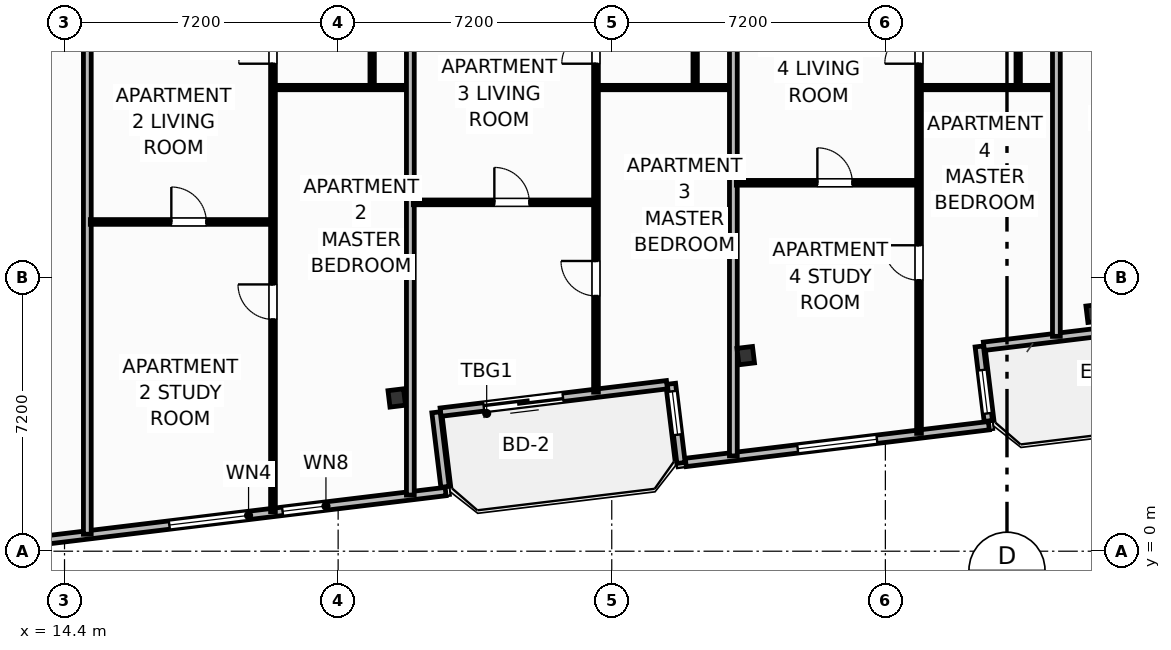
"""IFC4 building model, lengths in metres.
Left out: names, types, materials, properties, quantities, classifications, styles, units other than length and angle.
Written with IfcOpenShell. Run it as: python <this file> out.ifc"""

import sys

from ifc_helpers import new_model, si_unit, direction, frame, frame_2d, origin, origin_2d, place, context, subcontext, project, spatial, rectangle, i_section, extrude, element, fill, save


model = new_model("IFC4")
c1 = context("Model", 3, precision=1e-05, world=origin(), true_north=direction((0.0, 1.0)))
c2 = subcontext(c1, "Body", "Model", "MODEL_VIEW")
j1 = project(units=[si_unit("LENGTHUNIT", "METRE"), si_unit("PLANEANGLEUNIT", "RADIAN")], contexts=[c1])
p1 = place(None, origin())
s1 = spatial("IfcSite", under=j1, at=p1, CompositionType="ELEMENT")
p2 = place(p1, origin())
s2 = spatial("IfcBuilding", under=s1, at=p2, CompositionType="ELEMENT")
p3 = place(p2, frame((0.0, 0.0, 196.8)))
s3 = spatial("IfcBuildingStorey", under=s2, at=p3, CompositionType="ELEMENT", Elevation=196.8)
for number, where, z_axis, x_axis in (
    (1, (23.143, 4.033, 0.0), (0.0, 0.0, 1.0), (0.993, 0.12, 0.0)),
    (2, (32.325, 5.146, 0.0), (0.0, 0.0, 1.0), (0.993, 0.12, 0.0)),
    (3, (41.508, 6.26, 0.0), (0.0, 0.0, 1.0), (0.993, 0.12, 0.0)),
):
    element("IfcColumn", number, at=place(p3, frame(where, z_axis=z_axis, x_axis=x_axis)), inside=s3, PredefinedType="COLUMN", context=c2, shape_type="SweptSolid", body=[
        extrude(i_section(OverallWidth=0.412, OverallDepth=0.435, WebThickness=0.036, FlangeThickness=0.057, FilletRadius=0.025, at=origin_2d()), origin(), (0.0, 0.0, 1.0), 3.7),
    ])
p4 = place(p3, frame((30.252, 4.381, 0.0), z_axis=(0.0, 0.0, 1.0), x_axis=(-0.992735402148, -0.120318000826, 0.0)))
e4 = element("IfcWall", 4, at=p4, inside=s3, PredefinedType="SOLIDWALL", context=c2, shape_type="SweptSolid", body=[
    extrude(rectangle(XDim=6.0, YDim=0.22, at=frame_2d((3.0, 0.0))), origin(), (0.0, 0.0, 1.0), 2.73),
])
p5 = place(p4, frame((2.756, 0.0, 0.0)))
e5 = element("IfcOpeningElement", 5, at=p5, cuts=e4, PredefinedType="OPENING", context=c2, shape_type="SweptSolid", body=[
    extrude(rectangle(XDim=2.1, YDim=2.3, at=frame_2d((1.05, 1.15))), frame((0.0, 0.12, 0.0), z_axis=(0.0, -1.0, 0.0), x_axis=(1.0, 0.0, 0.0)), (0.0, 0.0, 1.0), 0.24),
])
p6 = place(p3, frame((44.548, 6.114, 0.0), z_axis=(0.0, 0.0, 1.0), x_axis=(-0.992735402148, -0.120318000826, 0.0)))
e6 = element("IfcWall", 6, at=p6, inside=s3, PredefinedType="SOLIDWALL", context=c2, shape_type="SweptSolid", body=[
    extrude(rectangle(XDim=6.0, YDim=0.22, at=frame_2d((3.0, 0.0))), origin(), (0.0, 0.0, 1.0), 2.73),
])
p7 = place(p6, frame((0.4, 0.0, 0.0)))
e7 = element("IfcOpeningElement", 7, at=p7, cuts=e6, PredefinedType="OPENING", context=c2, shape_type="SweptSolid", body=[
    extrude(rectangle(XDim=2.1, YDim=2.3, at=frame_2d((1.05, 1.15))), frame((0.0, 0.12, 0.0), z_axis=(0.0, -1.0, 0.0), x_axis=(1.0, 0.0, 0.0)), (0.0, 0.0, 1.0), 0.24),
])
p8 = place(p3, frame((11.972, 0.06, 0.0), z_axis=(0.0, 0.0, 1.0), x_axis=(0.992732021049, 0.120345894751, 0.0)))
e8 = element("IfcWall", 8, at=p8, inside=s3, PredefinedType="SOLIDWALL", context=c2, shape_type="SweptSolid", body=[
    extrude(rectangle(XDim=12.547, YDim=0.22, at=frame_2d((6.274, 0.0))), origin(), (0.0, 0.0, 1.0), 2.73),
])
p9 = place(p8, frame((5.224, 0.0, 0.8)))
e9 = element("IfcOpeningElement", 9, at=p9, cuts=e8, PredefinedType="OPENING", context=c2, shape_type="SweptSolid", body=[
    extrude(rectangle(XDim=2.1, YDim=1.75, at=frame_2d((1.05, 0.875))), frame((0.0, 0.12, 0.0), z_axis=(0.0, -1.0, 0.0), x_axis=(1.0, 0.0, 0.0)), (0.0, 0.0, 1.0), 0.24),
])
p10 = place(p8, frame((8.225, 0.0, 0.8)))
e10 = element("IfcOpeningElement", 10, at=p10, cuts=e8, PredefinedType="OPENING", context=c2, shape_type="SweptSolid", body=[
    extrude(rectangle(XDim=1.15, YDim=1.4, at=frame_2d((0.575, 0.7))), frame((0.0, 0.12, 0.0), z_axis=(0.0, -1.0, 0.0), x_axis=(1.0, 0.0, 0.0)), (0.0, 0.0, 1.0), 0.24),
])
p11 = place(p3, frame((24.413, 1.694, 0.0), z_axis=(0.0, 0.0, 1.0), x_axis=(-0.120290754542, 0.992738703976, 0.0)))
e11 = element("IfcWall", 11, at=p11, inside=s3, PredefinedType="SOLIDWALL", context=c2, shape_type="SweptSolid", body=[
    extrude(rectangle(XDim=1.975, YDim=0.22, at=frame_2d((0.987, 0.0))), origin(), (0.0, 0.0, 1.0), 2.73),
])
p12 = place(p3, frame((30.37, 4.406, 0.0), z_axis=(0.0, 0.0, 1.0), x_axis=(0.120327895535, -0.992734202874, 0.0)))
e12 = element("IfcWall", 12, at=p12, inside=s3, PredefinedType="SOLIDWALL", context=c2, shape_type="SweptSolid", body=[
    extrude(rectangle(XDim=2.1, YDim=0.22, at=frame_2d((1.05, 0.0))), origin(), (0.0, 0.0, 1.0), 2.73),
])
p13 = place(p12, frame((0.2, 0.0, 0.8)))
e13 = element("IfcOpeningElement", 13, at=p13, cuts=e12, PredefinedType="OPENING", context=c2, shape_type="SweptSolid", body=[
    extrude(rectangle(XDim=1.15, YDim=1.4, at=frame_2d((0.575, 0.7))), frame((0.0, 0.12, 0.0), z_axis=(0.0, -1.0, 0.0), x_axis=(1.0, 0.0, 0.0)), (0.0, 0.0, 1.0), 0.24),
])
p14 = place(p3, frame((30.747, 2.336, 0.0), z_axis=(0.0, 0.0, 1.0), x_axis=(0.992731032022, 0.120354052946, 0.0)))
e14 = element("IfcWall", 14, at=p14, inside=s3, PredefinedType="SOLIDWALL", context=c2, shape_type="SweptSolid", body=[
    extrude(rectangle(XDim=8.035, YDim=0.22, at=frame_2d((4.018, 0.0))), origin(), (0.0, 0.0, 1.0), 2.73),
])
p15 = place(p14, frame((2.968, 0.0, 0.8)))
e15 = element("IfcOpeningElement", 15, at=p15, cuts=e14, PredefinedType="OPENING", context=c2, shape_type="SweptSolid", body=[
    extrude(rectangle(XDim=2.1, YDim=1.75, at=frame_2d((1.05, 0.875))), frame((0.0, 0.12, 0.0), z_axis=(0.0, -1.0, 0.0), x_axis=(1.0, 0.0, 0.0)), (0.0, 0.0, 1.0), 0.24),
])
p16 = place(p3, frame((38.709, 3.427, 0.0), z_axis=(0.0, 0.0, 1.0), x_axis=(-0.120397815541, 0.992725725472, 0.0)))
e16 = element("IfcWall", 16, at=p16, inside=s3, PredefinedType="SOLIDWALL", context=c2, shape_type="SweptSolid", body=[
    extrude(rectangle(XDim=1.975, YDim=0.22, at=frame_2d((0.988, 0.0))), origin(), (0.0, 0.0, 1.0), 2.73),
])
p17 = place(p16, frame((0.2, 0.0, 0.8)))
e17 = element("IfcOpeningElement", 17, at=p17, cuts=e16, PredefinedType="OPENING", context=c2, shape_type="SweptSolid", body=[
    extrude(rectangle(XDim=1.15, YDim=1.4, at=frame_2d((0.575, 0.7))), frame((0.0, 0.12, 0.0), z_axis=(0.0, -1.0, 0.0), x_axis=(1.0, 0.0, 0.0)), (0.0, 0.0, 1.0), 0.24),
])
p18 = place(p3, frame((15.0, 0.447, 0.0), z_axis=(0.0, 0.0, 1.0), x_axis=(0.0, 1.0, 0.0)))
e18 = element("IfcWall", 18, at=p18, inside=s3, PredefinedType="PARTITIONING", context=c2, shape_type="SweptSolid", body=[
    extrude(rectangle(XDim=16.403, YDim=0.205, at=frame_2d((8.202, 0.0))), origin(), (0.0, 0.0, 1.0), 3.45),
])
p19 = place(p3, frame((15.08, 8.663, 0.0), z_axis=(0.0, 0.0, 1.0), x_axis=(1.0, 0.0, 0.0)))
e19 = element("IfcWall", 19, at=p19, inside=s3, PredefinedType="PARTITIONING", context=c2, shape_type="SweptSolid", body=[
    extrude(rectangle(XDim=4.735, YDim=0.125, at=frame_2d((2.368, 0.0))), origin(), (0.0, 0.0, 1.0), 3.45),
])
p20 = place(p19, frame((2.131, 0.0, 0.0)))
e20 = element("IfcOpeningElement", 20, at=p20, cuts=e19, PredefinedType="OPENING", context=c2, shape_type="SweptSolid", body=[
    extrude(rectangle(XDim=0.92, YDim=2.05, at=frame_2d((0.46, 1.025))), frame((0.0, 0.073, 0.0), z_axis=(0.0, -1.0, 0.0), x_axis=(1.0, 0.0, 0.0)), (0.0, 0.0, 1.0), 0.145),
])
p21 = place(p3, frame((19.885, 1.039, 0.0), z_axis=(0.0, 0.0, 1.0), x_axis=(0.0, 1.0, 0.0)))
e21 = element("IfcWall", 21, at=p21, inside=s3, PredefinedType="PARTITIONING", context=c2, shape_type="SweptSolid", body=[
    extrude(rectangle(XDim=15.811, YDim=0.125, at=frame_2d((7.905, 0.0))), origin(), (0.0, 0.0, 1.0), 3.45),
])
p22 = place(p21, frame((5.06, 0.0, 0.0)))
e22 = element("IfcOpeningElement", 22, at=p22, cuts=e21, PredefinedType="OPENING", context=c2, shape_type="SweptSolid", body=[
    extrude(rectangle(XDim=0.92, YDim=2.05, at=frame_2d((0.46, 1.025))), frame((0.0, 0.073, 0.0), z_axis=(0.0, -1.0, 0.0), x_axis=(1.0, 0.0, 0.0)), (0.0, 0.0, 1.0), 0.145),
])
p23 = place(p21, frame((11.788, 0.0, 0.0)))
e23 = element("IfcOpeningElement", 23, at=p23, cuts=e21, PredefinedType="OPENING", context=c2, shape_type="SweptSolid", body=[
    extrude(rectangle(XDim=0.9, YDim=2.05, at=frame_2d((0.45, 1.025))), frame((0.0, 0.073, 0.0), z_axis=(0.0, -1.0, 0.0), x_axis=(1.0, 0.0, 0.0)), (0.0, 0.0, 1.0), 0.145),
])
p24 = place(p21, frame((14.081, 0.0, 0.0)))
e24 = element("IfcOpeningElement", 24, at=p24, cuts=e21, PredefinedType="OPENING", context=c2, shape_type="SweptSolid", body=[
    extrude(rectangle(XDim=0.92, YDim=2.05, at=frame_2d((0.46, 1.025))), frame((0.0, 0.073, 0.0), z_axis=(0.0, -1.0, 0.0), x_axis=(1.0, 0.0, 0.0)), (0.0, 0.0, 1.0), 0.145),
])
p25 = place(p3, frame((19.955, 12.2, 0.0), z_axis=(0.0, 0.0, 1.0), x_axis=(1.0, 0.0, 0.0)))
e25 = element("IfcWall", 25, at=p25, inside=s3, PredefinedType="PARTITIONING", context=c2, shape_type="SweptSolid", body=[
    extrude(rectangle(XDim=3.465, YDim=0.115, at=frame_2d((1.732, 0.0))), origin(), (0.0, 0.0, 1.0), 3.45),
])
p26 = place(p3, frame((22.495, 12.2, 0.0), z_axis=(0.0, 0.0, 1.0), x_axis=(0.0, 1.0, 0.0)))
e26 = element("IfcWall", 26, at=p26, inside=s3, PredefinedType="PARTITIONING", context=c2, shape_type="SweptSolid", body=[
    extrude(rectangle(XDim=2.24, YDim=0.115, at=frame_2d((1.12, 0.0))), origin(), (0.0, 0.0, 1.0), 3.45),
])
p27 = place(p3, frame((23.5, 1.478, 0.0), z_axis=(0.0, 0.0, 1.0), x_axis=(0.0, 1.0, 0.0)))
e27 = element("IfcWall", 27, at=p27, inside=s3, PredefinedType="PARTITIONING", context=c2, shape_type="SweptSolid", body=[
    extrude(rectangle(XDim=15.373, YDim=0.205, at=frame_2d((7.686, 0.0))), origin(), (0.0, 0.0, 1.0), 2.662),
])
p28 = place(p3, frame((23.58, 9.179, 0.0), z_axis=(0.0, 0.0, 1.0), x_axis=(1.0, 0.0, 0.0)))
e28 = element("IfcWall", 28, at=p28, inside=s3, PredefinedType="PARTITIONING", context=c2, shape_type="SweptSolid", body=[
    extrude(rectangle(XDim=4.735, YDim=0.125, at=frame_2d((2.368, 0.0))), origin(), (0.0, 0.0, 1.0), 3.018),
])
p29 = place(p28, frame((2.131, 0.0, 0.0)))
e29 = element("IfcOpeningElement", 29, at=p29, cuts=e28, PredefinedType="OPENING", context=c2, shape_type="SweptSolid", body=[
    extrude(rectangle(XDim=0.92, YDim=2.05, at=frame_2d((0.46, 1.025))), frame((0.0, 0.073, 0.0), z_axis=(0.0, -1.0, 0.0), x_axis=(1.0, 0.0, 0.0)), (0.0, 0.0, 1.0), 0.145),
])
p30 = place(p3, frame((28.385, 4.185, 0.0), z_axis=(0.0, 0.0, 1.0), x_axis=(0.0, 1.0, 0.0)))
e30 = element("IfcWall", 30, at=p30, inside=s3, PredefinedType="PARTITIONING", context=c2, shape_type="SweptSolid", body=[
    extrude(rectangle(XDim=12.665, YDim=0.125, at=frame_2d((6.333, 0.0))), origin(), (0.0, 0.0, 1.0), 3.45),
])
p31 = place(p30, frame((2.531, 0.0, 0.0)))
e31 = element("IfcOpeningElement", 31, at=p31, cuts=e30, PredefinedType="OPENING", context=c2, shape_type="SweptSolid", body=[
    extrude(rectangle(XDim=0.92, YDim=2.05, at=frame_2d((0.46, 1.025))), frame((0.0, 0.073, 0.0), z_axis=(0.0, -1.0, 0.0), x_axis=(1.0, 0.0, 0.0)), (0.0, 0.0, 1.0), 0.145),
])
p32 = place(p30, frame((8.642, 0.0, 0.0)))
e32 = element("IfcOpeningElement", 32, at=p32, cuts=e30, PredefinedType="OPENING", context=c2, shape_type="SweptSolid", body=[
    extrude(rectangle(XDim=0.9, YDim=2.05, at=frame_2d((0.45, 1.025))), frame((0.0, 0.073, 0.0), z_axis=(0.0, -1.0, 0.0), x_axis=(1.0, 0.0, 0.0)), (0.0, 0.0, 1.0), 0.145),
])
p33 = place(p30, frame((10.935, 0.0, 0.0)))
e33 = element("IfcOpeningElement", 33, at=p33, cuts=e30, PredefinedType="OPENING", context=c2, shape_type="SweptSolid", body=[
    extrude(rectangle(XDim=0.92, YDim=2.05, at=frame_2d((0.46, 1.025))), frame((0.0, 0.073, 0.0), z_axis=(0.0, -1.0, 0.0), x_axis=(1.0, 0.0, 0.0)), (0.0, 0.0, 1.0), 0.145),
])
p34 = place(p3, frame((28.455, 12.2, 0.0), z_axis=(0.0, 0.0, 1.0), x_axis=(1.0, 0.0, 0.0)))
e34 = element("IfcWall", 34, at=p34, inside=s3, PredefinedType="PARTITIONING", context=c2, shape_type="SweptSolid", body=[
    extrude(rectangle(XDim=3.465, YDim=0.115, at=frame_2d((1.732, 0.0))), origin(), (0.0, 0.0, 1.0), 3.45),
])
p35 = place(p3, frame((30.995, 12.2, 0.0), z_axis=(0.0, 0.0, 1.0), x_axis=(0.0, 1.0, 0.0)))
e35 = element("IfcWall", 35, at=p35, inside=s3, PredefinedType="PARTITIONING", context=c2, shape_type="SweptSolid", body=[
    extrude(rectangle(XDim=2.24, YDim=0.115, at=frame_2d((1.12, 0.0))), origin(), (0.0, 0.0, 1.0), 3.45),
])
p36 = place(p3, frame((32.0, 2.508, 0.0), z_axis=(0.0, 0.0, 1.0), x_axis=(0.0, 1.0, 0.0)))
e36 = element("IfcWall", 36, at=p36, inside=s3, PredefinedType="PARTITIONING", context=c2, shape_type="SweptSolid", body=[
    extrude(rectangle(XDim=14.342, YDim=0.205, at=frame_2d((7.171, 0.0))), origin(), (0.0, 0.0, 1.0), 3.45),
])
p37 = place(p3, frame((32.08, 9.694, 0.0), z_axis=(0.0, 0.0, 1.0), x_axis=(1.0, 0.0, 0.0)))
e37 = element("IfcWall", 37, at=p37, inside=s3, PredefinedType="PARTITIONING", context=c2, shape_type="SweptSolid", body=[
    extrude(rectangle(XDim=4.735, YDim=0.125, at=frame_2d((2.368, 0.0))), origin(), (0.0, 0.0, 1.0), 3.45),
])
p38 = place(p37, frame((2.131, 0.0, 0.0)))
e38 = element("IfcOpeningElement", 38, at=p38, cuts=e37, PredefinedType="OPENING", context=c2, shape_type="SweptSolid", body=[
    extrude(rectangle(XDim=0.92, YDim=2.05, at=frame_2d((0.46, 1.025))), frame((0.0, 0.073, 0.0), z_axis=(0.0, -1.0, 0.0), x_axis=(1.0, 0.0, 0.0)), (0.0, 0.0, 1.0), 0.145),
])
p39 = place(p3, frame((36.885, 3.1, 0.0), z_axis=(0.0, 0.0, 1.0), x_axis=(0.0, 1.0, 0.0)))
e39 = element("IfcWall", 39, at=p39, inside=s3, PredefinedType="PARTITIONING", context=c2, shape_type="SweptSolid", body=[
    extrude(rectangle(XDim=13.75, YDim=0.125, at=frame_2d((6.875, 0.0))), origin(), (0.0, 0.0, 1.0), 3.45),
])
p40 = place(p39, frame((4.03, 0.0, 0.0)))
e40 = element("IfcOpeningElement", 40, at=p40, cuts=e39, PredefinedType="OPENING", context=c2, shape_type="SweptSolid", body=[
    extrude(rectangle(XDim=0.92, YDim=2.05, at=frame_2d((0.46, 1.025))), frame((0.0, 0.073, 0.0), z_axis=(0.0, -1.0, 0.0), x_axis=(1.0, 0.0, 0.0)), (0.0, 0.0, 1.0), 0.145),
])
p41 = place(p39, frame((9.727, 0.0, 0.0)))
e41 = element("IfcOpeningElement", 41, at=p41, cuts=e39, PredefinedType="OPENING", context=c2, shape_type="SweptSolid", body=[
    extrude(rectangle(XDim=0.9, YDim=2.05, at=frame_2d((0.45, 1.025))), frame((0.0, 0.073, 0.0), z_axis=(0.0, -1.0, 0.0), x_axis=(1.0, 0.0, 0.0)), (0.0, 0.0, 1.0), 0.145),
])
p42 = place(p39, frame((12.02, 0.0, 0.0)))
e42 = element("IfcOpeningElement", 42, at=p42, cuts=e39, PredefinedType="OPENING", context=c2, shape_type="SweptSolid", body=[
    extrude(rectangle(XDim=0.92, YDim=2.05, at=frame_2d((0.46, 1.025))), frame((0.0, 0.073, 0.0), z_axis=(0.0, -1.0, 0.0), x_axis=(1.0, 0.0, 0.0)), (0.0, 0.0, 1.0), 0.145),
])
p43 = place(p3, frame((36.955, 12.2, 0.0), z_axis=(0.0, 0.0, 1.0), x_axis=(1.0, 0.0, 0.0)))
e43 = element("IfcWall", 43, at=p43, inside=s3, PredefinedType="PARTITIONING", context=c2, shape_type="SweptSolid", body=[
    extrude(rectangle(XDim=3.465, YDim=0.115, at=frame_2d((1.732, 0.0))), origin(), (0.0, 0.0, 1.0), 3.45),
])
p44 = place(p3, frame((39.495, 12.2, 0.0), z_axis=(0.0, 0.0, 1.0), x_axis=(0.0, 1.0, 0.0)))
e44 = element("IfcWall", 44, at=p44, inside=s3, PredefinedType="PARTITIONING", context=c2, shape_type="SweptSolid", body=[
    extrude(rectangle(XDim=2.24, YDim=0.115, at=frame_2d((1.12, 0.0))), origin(), (0.0, 0.0, 1.0), 3.45),
])
p45 = place(p3, frame((40.5, 5.654, 0.0), z_axis=(0.0, 0.0, 1.0), x_axis=(0.0, 1.0, 0.0)))
e45 = element("IfcWall", 45, at=p45, inside=s3, PredefinedType="PARTITIONING", context=c2, shape_type="SweptSolid", body=[
    extrude(rectangle(XDim=11.196, YDim=0.205, at=frame_2d((5.598, 0.0))), origin(), (0.0, 0.0, 1.0), 3.45),
])
p46 = place(p5, origin())
e46 = element("IfcDoor", 46, at=p46, inside=s3, OperationType="SLIDING_TO_LEFT", PredefinedType="DOOR", context=c2, shape_type="SweptSolid", body=[
    extrude(rectangle(XDim=2.1, YDim=2.3, at=frame_2d((1.05, 1.15))), frame((0.0, 0.025, 0.0), z_axis=(0.0, -1.0, 0.0), x_axis=(1.0, 0.0, 0.0)), (0.0, 0.0, 1.0), 0.05),
])
fill(e5, e46)
p47 = place(p9, origin())
e47 = element("IfcWindow", 47, at=p47, inside=s3, PartitioningType="SINGLE_PANEL", PredefinedType="WINDOW", context=c2, shape_type="SweptSolid", body=[
    extrude(rectangle(XDim=2.1, YDim=1.75, at=frame_2d((1.05, 0.875))), frame((0.0, 0.03, 0.0), z_axis=(0.0, -1.0, 0.0), x_axis=(1.0, 0.0, 0.0)), (0.0, 0.0, 1.0), 0.06),
])
fill(e9, e47)
p48 = place(p15, origin())
e48 = element("IfcWindow", 48, at=p48, inside=s3, PartitioningType="SINGLE_PANEL", PredefinedType="WINDOW", context=c2, shape_type="SweptSolid", body=[
    extrude(rectangle(XDim=2.1, YDim=1.75, at=frame_2d((1.05, 0.875))), frame((0.0, 0.03, 0.0), z_axis=(0.0, -1.0, 0.0), x_axis=(1.0, 0.0, 0.0)), (0.0, 0.0, 1.0), 0.06),
])
fill(e15, e48)
p49 = place(p20, origin())
e49 = element("IfcDoor", 49, at=p49, inside=s3, OperationType="SINGLE_SWING_LEFT", PredefinedType="DOOR", context=c2, shape_type="SweptSolid", body=[
    extrude(rectangle(XDim=0.92, YDim=2.05, at=frame_2d((0.46, 1.025))), frame((0.0, 0.025, 0.0), z_axis=(0.0, -1.0, 0.0), x_axis=(1.0, 0.0, 0.0)), (0.0, 0.0, 1.0), 0.05),
])
fill(e20, e49)
p50 = place(p22, origin())
e50 = element("IfcDoor", 50, at=p50, inside=s3, OperationType="SINGLE_SWING_RIGHT", PredefinedType="DOOR", context=c2, shape_type="SweptSolid", body=[
    extrude(rectangle(XDim=0.92, YDim=2.05, at=frame_2d((0.46, 1.025))), frame((0.0, 0.025, 0.0), z_axis=(0.0, -1.0, 0.0), x_axis=(1.0, 0.0, 0.0)), (0.0, 0.0, 1.0), 0.05),
])
fill(e22, e50)
p51 = place(p23, origin())
e51 = element("IfcDoor", 51, at=p51, inside=s3, OperationType="SINGLE_SWING_LEFT", PredefinedType="DOOR", context=c2, shape_type="SweptSolid", body=[
    extrude(rectangle(XDim=0.9, YDim=2.05, at=frame_2d((0.45, 1.025))), frame((0.0, 0.025, 0.0), z_axis=(0.0, -1.0, 0.0), x_axis=(1.0, 0.0, 0.0)), (0.0, 0.0, 1.0), 0.05),
])
fill(e23, e51)
p52 = place(p29, origin())
e52 = element("IfcDoor", 52, at=p52, inside=s3, OperationType="SINGLE_SWING_LEFT", PredefinedType="DOOR", context=c2, shape_type="SweptSolid", body=[
    extrude(rectangle(XDim=0.92, YDim=2.05, at=frame_2d((0.46, 1.025))), frame((0.0, 0.025, 0.0), z_axis=(0.0, -1.0, 0.0), x_axis=(1.0, 0.0, 0.0)), (0.0, 0.0, 1.0), 0.05),
])
fill(e29, e52)
p53 = place(p31, origin())
e53 = element("IfcDoor", 53, at=p53, inside=s3, OperationType="SINGLE_SWING_RIGHT", PredefinedType="DOOR", context=c2, shape_type="SweptSolid", body=[
    extrude(rectangle(XDim=0.92, YDim=2.05, at=frame_2d((0.46, 1.025))), frame((0.0, 0.025, 0.0), z_axis=(0.0, -1.0, 0.0), x_axis=(1.0, 0.0, 0.0)), (0.0, 0.0, 1.0), 0.05),
])
fill(e31, e53)
p54 = place(p32, origin())
e54 = element("IfcDoor", 54, at=p54, inside=s3, OperationType="SINGLE_SWING_LEFT", PredefinedType="DOOR", context=c2, shape_type="SweptSolid", body=[
    extrude(rectangle(XDim=0.9, YDim=2.05, at=frame_2d((0.45, 1.025))), frame((0.0, 0.025, 0.0), z_axis=(0.0, -1.0, 0.0), x_axis=(1.0, 0.0, 0.0)), (0.0, 0.0, 1.0), 0.05),
])
fill(e32, e54)
p55 = place(p38, origin())
e55 = element("IfcDoor", 55, at=p55, inside=s3, OperationType="SINGLE_SWING_LEFT", PredefinedType="DOOR", context=c2, shape_type="SweptSolid", body=[
    extrude(rectangle(XDim=0.92, YDim=2.05, at=frame_2d((0.46, 1.025))), frame((0.0, 0.025, 0.0), z_axis=(0.0, -1.0, 0.0), x_axis=(1.0, 0.0, 0.0)), (0.0, 0.0, 1.0), 0.05),
])
fill(e38, e55)
p56 = place(p40, origin())
e56 = element("IfcDoor", 56, at=p56, inside=s3, OperationType="SINGLE_SWING_RIGHT", PredefinedType="DOOR", context=c2, shape_type="SweptSolid", body=[
    extrude(rectangle(XDim=0.92, YDim=2.05, at=frame_2d((0.46, 1.025))), frame((0.0, 0.025, 0.0), z_axis=(0.0, -1.0, 0.0), x_axis=(1.0, 0.0, 0.0)), (0.0, 0.0, 1.0), 0.05),
])
fill(e40, e56)
p57 = place(p41, origin())
e57 = element("IfcDoor", 57, at=p57, inside=s3, OperationType="SINGLE_SWING_LEFT", PredefinedType="DOOR", context=c2, shape_type="SweptSolid", body=[
    extrude(rectangle(XDim=0.9, YDim=2.05, at=frame_2d((0.45, 1.025))), frame((0.0, 0.025, 0.0), z_axis=(0.0, -1.0, 0.0), x_axis=(1.0, 0.0, 0.0)), (0.0, 0.0, 1.0), 0.05),
])
fill(e41, e57)
p58 = place(p10, origin())
e58 = element("IfcWindow", 58, at=p58, inside=s3, PartitioningType="SINGLE_PANEL", PredefinedType="WINDOW", context=c2, shape_type="SweptSolid", body=[
    extrude(rectangle(XDim=1.15, YDim=1.4, at=frame_2d((0.575, 0.7))), frame((0.0, 0.03, 0.0), z_axis=(0.0, -1.0, 0.0), x_axis=(1.0, 0.0, 0.0)), (0.0, 0.0, 1.0), 0.06),
])
fill(e10, e58)
p59 = place(p13, origin())
e59 = element("IfcWindow", 59, at=p59, inside=s3, PartitioningType="SINGLE_PANEL", PredefinedType="WINDOW", context=c2, shape_type="SweptSolid", body=[
    extrude(rectangle(XDim=1.15, YDim=1.4, at=frame_2d((0.575, 0.7))), frame((0.0, 0.03, 0.0), z_axis=(0.0, -1.0, 0.0), x_axis=(1.0, 0.0, 0.0)), (0.0, 0.0, 1.0), 0.06),
])
fill(e13, e59)
p60 = place(p17, origin())
e60 = element("IfcWindow", 60, at=p60, inside=s3, PartitioningType="SINGLE_PANEL", PredefinedType="WINDOW", context=c2, shape_type="SweptSolid", body=[
    extrude(rectangle(XDim=1.15, YDim=1.4, at=frame_2d((0.575, 0.7))), frame((0.0, 0.03, 0.0), z_axis=(0.0, -1.0, 0.0), x_axis=(1.0, 0.0, 0.0)), (0.0, 0.0, 1.0), 0.06),
])
fill(e17, e60)
save(model, sys.argv[1])
